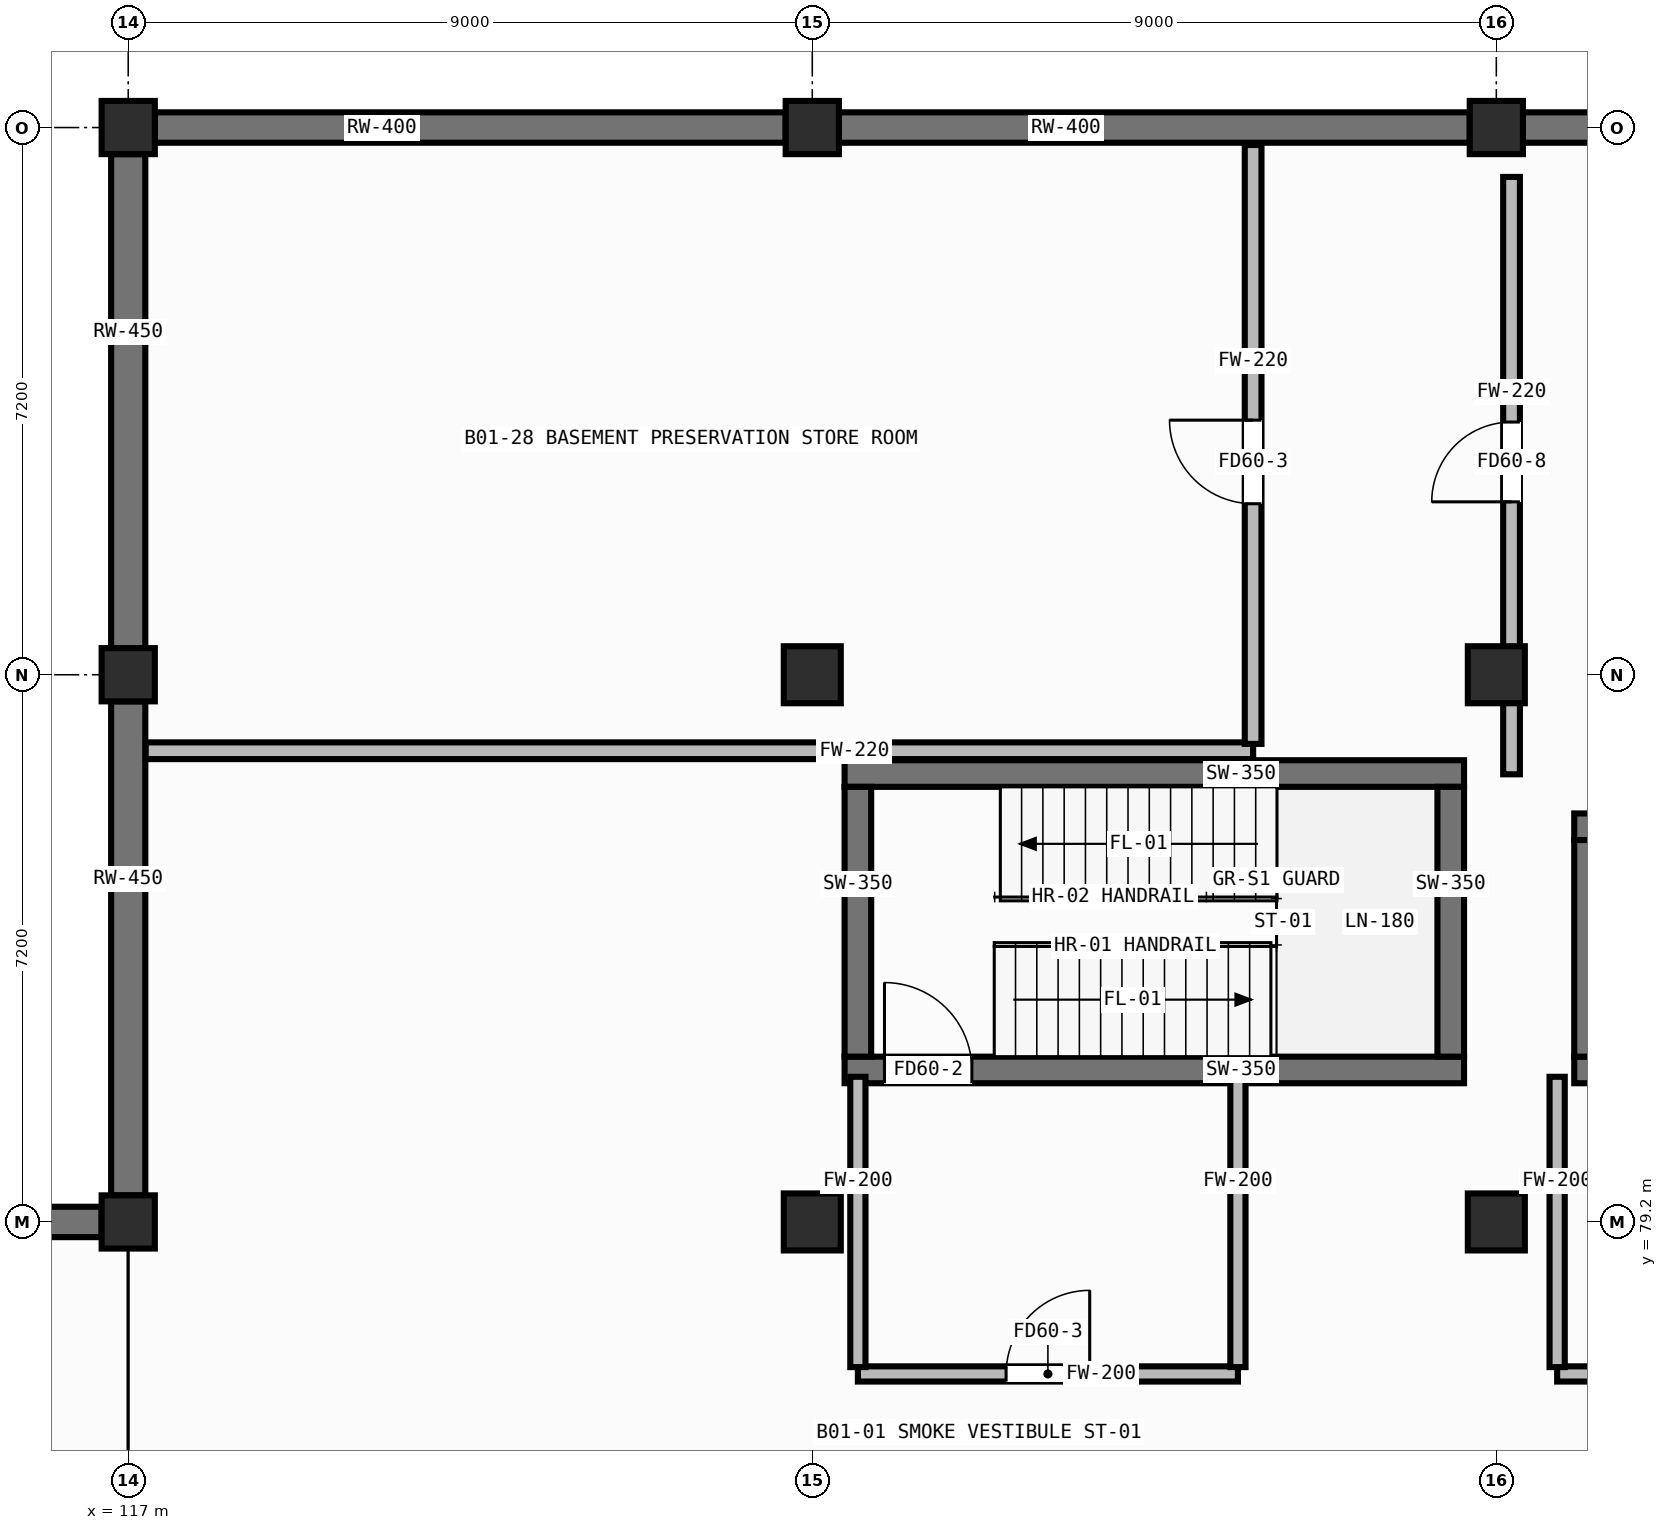
"""IFC4 building model, lengths in metres.
Left out: names, types, materials, properties, quantities, classifications, styles, units other than length and angle.
Written with IfcOpenShell. Run it as: python <this file> out.ifc"""

import sys

from ifc_helpers import new_model, si_unit, direction, frame, frame_2d, origin, origin_2d, place, context, subcontext, project, spatial, rectangle, hollow_rectangle, extrude, element, fill, save


model = new_model("IFC4")
c1 = context("Model", 3, precision=1e-05, world=origin(), true_north=direction((0.0, 1.0)))
c2 = subcontext(c1, "Body", "Model", "MODEL_VIEW")
j1 = project(units=[si_unit("LENGTHUNIT", "METRE"), si_unit("PLANEANGLEUNIT", "RADIAN")], contexts=[c1])
p1 = place(None, origin())
s1 = spatial("IfcSite", under=j1, at=p1, CompositionType="ELEMENT")
p2 = place(p1, origin())
s2 = spatial("IfcBuilding", under=s1, at=p2, CompositionType="ELEMENT")
p3 = place(p2, frame((0.0, 0.0, -4.9)))
s3 = spatial("IfcBuildingStorey", under=s2, at=p3, CompositionType="ELEMENT", Elevation=-4.9)
for number, where, z_axis, x_axis in (
    (1, (117.0, 79.2, 0.0), (0.0, 0.0, 1.0), (1.0, 0.0, 0.0)),
    (2, (117.0, 86.4, 0.0), (0.0, 0.0, 1.0), (1.0, 0.0, 0.0)),
    (3, (117.0, 93.6, 0.0), (0.0, 0.0, 1.0), (1.0, 0.0, 0.0)),
):
    element("IfcColumn", number, at=place(p3, frame(where, z_axis=z_axis, x_axis=x_axis)), inside=s3, PredefinedType="COLUMN", context=c2, shape_type="SweptSolid", body=[
        extrude(hollow_rectangle(XDim=0.7, YDim=0.7, WallThickness=0.028, at=origin_2d()), origin(), (0.0, 0.0, 1.0), 4.9),
    ])
for number, where, z_axis, x_axis in (
    (4, (126.0, 79.2, 0.0), (0.0, 0.0, 1.0), (1.0, 0.0, 0.0)),
    (5, (126.0, 86.4, 0.0), (0.0, 0.0, 1.0), (1.0, 0.0, 0.0)),
):
    element("IfcColumn", number, at=place(p3, frame(where, z_axis=z_axis, x_axis=x_axis)), inside=s3, PredefinedType="COLUMN", context=c2, shape_type="SweptSolid", body=[
        extrude(hollow_rectangle(XDim=0.75, YDim=0.75, WallThickness=0.032, at=origin_2d()), origin(), (0.0, 0.0, 1.0), 4.9),
    ])
p4 = place(p3, frame((126.0, 93.6, 0.0), z_axis=(0.0, 0.0, 1.0), x_axis=(1.0, 0.0, 0.0)))
e6 = element("IfcColumn", 6, at=p4, inside=s3, PredefinedType="COLUMN", context=c2, shape_type="SweptSolid", body=[
    extrude(hollow_rectangle(XDim=0.7, YDim=0.7, WallThickness=0.028, at=origin_2d()), origin(), (0.0, 0.0, 1.0), 4.9),
])
for number, where, z_axis, x_axis in (
    (7, (135.0, 79.2, 0.0), (0.0, 0.0, 1.0), (1.0, 0.0, 0.0)),
    (8, (135.0, 86.4, 0.0), (0.0, 0.0, 1.0), (1.0, 0.0, 0.0)),
):
    element("IfcColumn", number, at=place(p3, frame(where, z_axis=z_axis, x_axis=x_axis)), inside=s3, PredefinedType="COLUMN", context=c2, shape_type="SweptSolid", body=[
        extrude(hollow_rectangle(XDim=0.75, YDim=0.75, WallThickness=0.032, at=origin_2d()), origin(), (0.0, 0.0, 1.0), 4.9),
    ])
p5 = place(p3, frame((135.0, 93.6, 0.0), z_axis=(0.0, 0.0, 1.0), x_axis=(1.0, 0.0, 0.0)))
e9 = element("IfcColumn", 9, at=p5, inside=s3, PredefinedType="COLUMN", context=c2, shape_type="SweptSolid", body=[
    extrude(hollow_rectangle(XDim=0.7, YDim=0.7, WallThickness=0.028, at=origin_2d()), origin(), (0.0, 0.0, 1.0), 4.9),
])
p6 = place(p3, frame((116.65, 79.2, 0.0), z_axis=(0.0, 0.0, 1.0), x_axis=(-1.0, 0.0, 0.0)))
e10 = element("IfcWall", 10, at=p6, inside=s3, PredefinedType="SOLIDWALL", context=c2, shape_type="SweptSolid", body=[
    extrude(rectangle(XDim=8.4, YDim=0.4, at=frame_2d((4.2, 0.0))), origin(), (0.0, 0.0, 1.0), 4.125),
])
for number, where, z_axis, x_axis in (
    (11, (125.65, 93.6, 0.0), (0.0, 0.0, 1.0), (-1.0, 0.0, 0.0)),
    (12, (134.65, 93.6, 0.0), (0.0, 0.0, 1.0), (-1.0, 0.0, 0.0)),
    (13, (143.65, 93.6, 0.0), (0.0, 0.0, 1.0), (-1.0, 0.0, 0.0)),
):
    element("IfcWall", number, at=place(p3, frame(where, z_axis=z_axis, x_axis=x_axis)), inside=s3, PredefinedType="SOLIDWALL", context=c2, shape_type="SweptSolid", body=[
        extrude(rectangle(XDim=8.3, YDim=0.4, at=frame_2d((4.15, 0.0))), origin(), (0.0, 0.0, 1.0), 4.125),
    ])
for number, where, z_axis, x_axis in (
    (14, (117.0, 79.55, 0.0), (0.0, 0.0, 1.0), (0.0, 1.0, 0.0)),
    (15, (117.0, 86.75, 0.0), (0.0, 0.0, 1.0), (0.0, 1.0, 0.0)),
):
    element("IfcWall", number, at=place(p3, frame(where, z_axis=z_axis, x_axis=x_axis)), inside=s3, PredefinedType="SOLIDWALL", context=c2, shape_type="SweptSolid", body=[
        extrude(rectangle(XDim=6.5, YDim=0.45, at=frame_2d((3.25, 0.0))), origin(), (0.0, 0.0, 1.0), 4.125),
    ])
p7 = place(p3, frame((126.425, 81.2, 0.0), z_axis=(0.0, 0.0, 1.0), x_axis=(1.0, 0.0, 0.0)))
e16 = element("IfcWall", 16, at=p7, inside=s3, PredefinedType="SHEAR", context=c2, shape_type="SweptSolid", body=[
    extrude(rectangle(XDim=8.15, YDim=0.35, at=frame_2d((4.075, 0.0))), origin(), (0.0, 0.0, 1.0), 4.625),
])
p8 = place(p7, frame((0.525, 0.0, 0.0)))
e17 = element("IfcOpeningElement", 17, at=p8, cuts=e16, PredefinedType="OPENING", context=c2, shape_type="SweptSolid", body=[
    extrude(rectangle(XDim=1.15, YDim=2.1, at=frame_2d((0.575, 1.05))), frame((0.0, 0.187, 0.0), z_axis=(0.0, -1.0, 0.0), x_axis=(1.0, 0.0, 0.0)), (0.0, 0.0, 1.0), 0.374),
])
p9 = place(p3, frame((126.425, 85.1, 0.0), z_axis=(0.0, 0.0, 1.0), x_axis=(1.0, 0.0, 0.0)))
e18 = element("IfcWall", 18, at=p9, inside=s3, PredefinedType="SHEAR", context=c2, shape_type="SweptSolid", body=[
    extrude(rectangle(XDim=8.15, YDim=0.35, at=frame_2d((4.075, 0.0))), origin(), (0.0, 0.0, 1.0), 4.625),
])
for number, where, z_axis, x_axis in (
    (19, (126.6, 81.375, 0.0), (0.0, 0.0, 1.0), (0.0, 1.0, 0.0)),
    (20, (134.4, 81.375, 0.0), (0.0, 0.0, 1.0), (0.0, 1.0, 0.0)),
):
    element("IfcWall", number, at=place(p3, frame(where, z_axis=z_axis, x_axis=x_axis)), inside=s3, PredefinedType="SHEAR", context=c2, shape_type="SweptSolid", body=[
        extrude(rectangle(XDim=3.55, YDim=0.35, at=frame_2d((1.775, 0.0))), origin(), (0.0, 0.0, 1.0), 4.625),
    ])
p10 = place(p3, frame((136.025, 81.2, 0.0), z_axis=(0.0, 0.0, 1.0), x_axis=(1.0, 0.0, 0.0)))
e21 = element("IfcWall", 21, at=p10, inside=s3, PredefinedType="SHEAR", context=c2, shape_type="SweptSolid", body=[
    extrude(rectangle(XDim=2.75, YDim=0.35, at=frame_2d((1.375, 0.0))), origin(), (0.0, 0.0, 1.0), 4.625),
])
p11 = place(p10, frame((0.8, 0.0, 0.0)))
e22 = element("IfcOpeningElement", 22, at=p11, cuts=e21, PredefinedType="OPENING", context=c2, shape_type="SweptSolid", body=[
    extrude(rectangle(XDim=1.15, YDim=2.12, at=frame_2d((0.575, 1.06))), frame((0.0, 0.187, 0.0), z_axis=(0.0, -1.0, 0.0), x_axis=(1.0, 0.0, 0.0)), (0.0, 0.0, 1.0), 0.374),
])
p12 = place(p3, frame((136.025, 84.4, 0.0), z_axis=(0.0, 0.0, 1.0), x_axis=(1.0, 0.0, 0.0)))
e23 = element("IfcWall", 23, at=p12, inside=s3, PredefinedType="SHEAR", context=c2, shape_type="SweptSolid", body=[
    extrude(rectangle(XDim=2.75, YDim=0.35, at=frame_2d((1.375, 0.0))), origin(), (0.0, 0.0, 1.0), 4.625),
])
p13 = place(p3, frame((136.2, 81.375, 0.0), z_axis=(0.0, 0.0, 1.0), x_axis=(0.0, 1.0, 0.0)))
e24 = element("IfcWall", 24, at=p13, inside=s3, PredefinedType="SHEAR", context=c2, shape_type="SweptSolid", body=[
    extrude(rectangle(XDim=2.85, YDim=0.35, at=frame_2d((1.425, 0.0))), origin(), (0.0, 0.0, 1.0), 4.625),
])
p14 = place(p3, frame((126.6, 77.2, 0.0), z_axis=(0.0, 0.0, 1.0), x_axis=(1.0, 0.0, 0.0)))
e25 = element("IfcWall", 25, at=p14, inside=s3, PredefinedType="PARTITIONING", context=c2, shape_type="SweptSolid", body=[
    extrude(rectangle(XDim=5.0, YDim=0.2, at=frame_2d((2.5, 0.0))), origin(), (0.0, 0.0, 1.0), 4.625),
])
p15 = place(p14, frame((1.95, 0.0, 0.0)))
e26 = element("IfcOpeningElement", 26, at=p15, cuts=e25, PredefinedType="OPENING", context=c2, shape_type="SweptSolid", body=[
    extrude(rectangle(XDim=1.1, YDim=2.08, at=frame_2d((0.55, 1.04))), frame((0.0, 0.112, 0.0), z_axis=(0.0, -1.0, 0.0), x_axis=(1.0, 0.0, 0.0)), (0.0, 0.0, 1.0), 0.224),
])
for number, where, z_axis, x_axis in (
    (27, (126.6, 77.29, 0.0), (0.0, 0.0, 1.0), (0.0, 1.0, 0.0)),
    (28, (131.6, 77.29, 0.0), (0.0, 0.0, 1.0), (0.0, 1.0, 0.0)),
):
    element("IfcWall", number, at=place(p3, frame(where, z_axis=z_axis, x_axis=x_axis)), inside=s3, PredefinedType="PARTITIONING", context=c2, shape_type="SweptSolid", body=[
        extrude(rectangle(XDim=3.82, YDim=0.2, at=frame_2d((1.91, 0.0))), origin(), (0.0, 0.0, 1.0), 4.625),
    ])
p16 = place(p3, frame((135.8, 77.2, 0.0), z_axis=(0.0, 0.0, 1.0), x_axis=(1.0, 0.0, 0.0)))
e29 = element("IfcWall", 29, at=p16, inside=s3, PredefinedType="PARTITIONING", context=c2, shape_type="SweptSolid", body=[
    extrude(rectangle(XDim=7.8, YDim=0.2, at=frame_2d((3.9, 0.0))), origin(), (0.0, 0.0, 1.0), 4.625),
])
p17 = place(p16, frame((3.1, 0.0, 0.0)))
e30 = element("IfcOpeningElement", 30, at=p17, cuts=e29, PredefinedType="OPENING", context=c2, shape_type="SweptSolid", body=[
    extrude(rectangle(XDim=1.2, YDim=2.1, at=frame_2d((0.6, 1.05))), frame((0.0, 0.112, 0.0), z_axis=(0.0, -1.0, 0.0), x_axis=(1.0, 0.0, 0.0)), (0.0, 0.0, 1.0), 0.224),
])
p18 = place(p3, frame((135.8, 77.29, 0.0), z_axis=(0.0, 0.0, 1.0), x_axis=(0.0, 1.0, 0.0)))
e31 = element("IfcWall", 31, at=p18, inside=s3, PredefinedType="PARTITIONING", context=c2, shape_type="SweptSolid", body=[
    extrude(rectangle(XDim=3.82, YDim=0.2, at=frame_2d((1.91, 0.0))), origin(), (0.0, 0.0, 1.0), 4.625),
])
p19 = place(p3, frame((117.23, 85.4, 0.0), z_axis=(0.0, 0.0, 1.0), x_axis=(1.0, 0.0, 0.0)))
e32 = element("IfcWall", 32, at=p19, inside=s3, PredefinedType="PARTITIONING", context=c2, shape_type="SweptSolid", body=[
    extrude(rectangle(XDim=14.57, YDim=0.22, at=frame_2d((7.285, 0.0))), origin(), (0.0, 0.0, 1.0), 4.625),
])
p20 = place(p3, frame((131.8, 85.49, 0.0), z_axis=(0.0, 0.0, 1.0), x_axis=(0.0, 1.0, 0.0)))
e33 = element("IfcWall", 33, at=p20, inside=s3, PredefinedType="PARTITIONING", context=c2, shape_type="SweptSolid", body=[
    extrude(rectangle(XDim=7.88, YDim=0.22, at=frame_2d((3.94, 0.0))), origin(), (0.0, 0.0, 1.0), 4.625),
])
p21 = place(p20, frame((3.16, 0.0, 0.0)))
e34 = element("IfcOpeningElement", 34, at=p21, cuts=e33, PredefinedType="OPENING", context=c2, shape_type="SweptSolid", body=[
    extrude(rectangle(XDim=1.1, YDim=2.08, at=frame_2d((0.55, 1.04))), frame((0.0, 0.122, 0.0), z_axis=(0.0, -1.0, 0.0), x_axis=(1.0, 0.0, 0.0)), (0.0, 0.0, 1.0), 0.244),
])
p22 = place(p3, frame((135.2, 85.09, 0.0), z_axis=(0.0, 0.0, 1.0), x_axis=(0.0, 1.0, 0.0)))
e35 = element("IfcWall", 35, at=p22, inside=s3, PredefinedType="PARTITIONING", context=c2, shape_type="SweptSolid", body=[
    extrude(rectangle(XDim=7.86, YDim=0.22, at=frame_2d((3.93, 0.0))), origin(), (0.0, 0.0, 1.0), 3.905),
])
p23 = place(p22, frame((3.585, 0.0, 0.0)))
e36 = element("IfcOpeningElement", 36, at=p23, cuts=e35, PredefinedType="OPENING", context=c2, shape_type="SweptSolid", body=[
    extrude(rectangle(XDim=1.05, YDim=2.02, at=frame_2d((0.525, 1.01))), frame((0.0, 0.122, 0.0), z_axis=(0.0, -1.0, 0.0), x_axis=(1.0, 0.0, 0.0)), (0.0, 0.0, 1.0), 0.244),
])
p24 = place(p8, origin())
e37 = element("IfcDoor", 37, at=p24, inside=s3, OperationType="SINGLE_SWING_LEFT", PredefinedType="DOOR", context=c2, shape_type="SweptSolid", body=[
    extrude(rectangle(XDim=1.15, YDim=2.1, at=frame_2d((0.575, 1.05))), frame((0.0, 0.025, 0.0), z_axis=(0.0, -1.0, 0.0), x_axis=(1.0, 0.0, 0.0)), (0.0, 0.0, 1.0), 0.05),
])
fill(e17, e37)
p25 = place(p15, origin())
e38 = element("IfcDoor", 38, at=p25, inside=s3, OperationType="SINGLE_SWING_RIGHT", PredefinedType="DOOR", context=c2, shape_type="SweptSolid", body=[
    extrude(rectangle(XDim=1.1, YDim=2.08, at=frame_2d((0.55, 1.04))), frame((0.0, 0.025, 0.0), z_axis=(0.0, -1.0, 0.0), x_axis=(1.0, 0.0, 0.0)), (0.0, 0.0, 1.0), 0.05),
])
fill(e26, e38)
p26 = place(p21, origin())
e39 = element("IfcDoor", 39, at=p26, inside=s3, OperationType="SINGLE_SWING_RIGHT", PredefinedType="DOOR", context=c2, shape_type="SweptSolid", body=[
    extrude(rectangle(XDim=1.1, YDim=2.08, at=frame_2d((0.55, 1.04))), frame((0.0, 0.025, 0.0), z_axis=(0.0, -1.0, 0.0), x_axis=(1.0, 0.0, 0.0)), (0.0, 0.0, 1.0), 0.05),
])
fill(e34, e39)
p27 = place(p23, origin())
e40 = element("IfcDoor", 40, at=p27, inside=s3, OperationType="SINGLE_SWING_LEFT", PredefinedType="DOOR", context=c2, shape_type="SweptSolid", body=[
    extrude(rectangle(XDim=1.05, YDim=2.02, at=frame_2d((0.525, 1.01))), frame((0.0, 0.025, 0.0), z_axis=(0.0, -1.0, 0.0), x_axis=(1.0, 0.0, 0.0)), (0.0, 0.0, 1.0), 0.05),
])
fill(e36, e40)
save(model, sys.argv[1])
